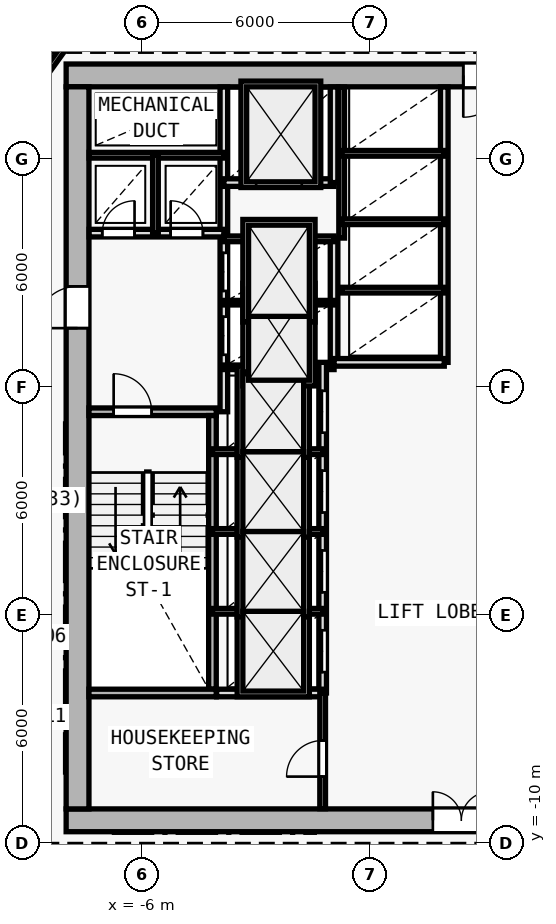
"""IFC4 building model, lengths in metres.
Left out: names, types, materials, properties, quantities, classifications, styles, units other than length and angle.
Written with IfcOpenShell. Run it as: python <this file> out.ifc"""

import sys

from ifc_helpers import new_model, si_unit, direction, frame, frame_2d, origin, origin_2d, place, context, subcontext, project, spatial, rectangle, i_section, extrude, element, fill, save


model = new_model("IFC4")
c1 = context("Model", 3, precision=1e-05, world=origin(), true_north=direction((0.0, 1.0)))
c2 = subcontext(c1, "Body", "Model", "MODEL_VIEW")
j1 = project(units=[si_unit("LENGTHUNIT", "METRE"), si_unit("PLANEANGLEUNIT", "RADIAN")], contexts=[c1])
p1 = place(None, origin())
s1 = spatial("IfcSite", under=j1, at=p1, CompositionType="ELEMENT")
p2 = place(p1, origin())
s2 = spatial("IfcBuilding", under=s1, at=p2, CompositionType="ELEMENT")
p3 = place(p2, frame((0.0, 0.0, 125.7)))
s3 = spatial("IfcBuildingStorey", under=s2, at=p3, CompositionType="ELEMENT", Elevation=125.7)
for number, where, z_axis, x_axis in (
    (1, (-7.7, -9.4, 0.0), (0.0, 0.0, 1.0), (1.0, 0.0, 0.0)),
    (2, (-7.7, 10.2, 0.0), (0.0, 0.0, 1.0), (1.0, 0.0, 0.0)),
    (3, (0.0, -9.4, 0.0), (0.0, 0.0, 1.0), (1.0, 0.0, 0.0)),
    (4, (-7.7, 2.0, 0.0), (0.0, 0.0, 1.0), (1.0, 0.0, 0.0)),
):
    element("IfcColumn", number, at=place(p3, frame(where, z_axis=z_axis, x_axis=x_axis)), inside=s3, PredefinedType="COLUMN", context=c2, shape_type="SweptSolid", body=[
        extrude(i_section(OverallWidth=0.409, OverallDepth=0.425, WebThickness=0.021, FlangeThickness=0.034, FilletRadius=0.015, at=origin_2d()), origin(), (0.0, 0.0, 1.0), 3.6),
    ])
p4 = place(p3, frame((-8.0, -9.4, 0.0), z_axis=(0.0, 0.0, 1.0), x_axis=(1.0, 0.0, 0.0)))
e5 = element("IfcWall", 5, at=p4, inside=s3, PredefinedType="SHEAR", context=c2, shape_type="SweptSolid", body=[
    extrude(rectangle(XDim=16.0, YDim=0.6, at=frame_2d((8.0, 0.0))), origin(), (0.0, 0.0, 1.0), 3.28),
])
p5 = place(p4, frame((9.65, 0.0, 0.0)))
e6 = element("IfcOpeningElement", 6, at=p5, cuts=e5, PredefinedType="OPENING", context=c2, shape_type="SweptSolid", body=[
    extrude(rectangle(XDim=1.5, YDim=2.2, at=frame_2d((0.75, 1.1))), frame((0.0, 0.31, 0.0), z_axis=(0.0, -1.0, 0.0), x_axis=(1.0, 0.0, 0.0)), (0.0, 0.0, 1.0), 0.62),
])
p6 = place(p3, frame((8.0, 10.2, 0.0), z_axis=(0.0, 0.0, 1.0), x_axis=(-1.0, 0.0, 0.0)))
e7 = element("IfcWall", 7, at=p6, inside=s3, PredefinedType="SHEAR", context=c2, shape_type="SweptSolid", body=[
    extrude(rectangle(XDim=16.0, YDim=0.6, at=frame_2d((8.0, 0.0))), origin(), (0.0, 0.0, 1.0), 3.28),
])
p7 = place(p6, frame((4.45, 0.0, 0.0)))
e8 = element("IfcOpeningElement", 8, at=p7, cuts=e7, PredefinedType="OPENING", context=c2, shape_type="SweptSolid", body=[
    extrude(rectangle(XDim=1.1, YDim=2.15, at=frame_2d((0.55, 1.075))), frame((0.0, 0.31, 0.0), z_axis=(0.0, -1.0, 0.0), x_axis=(1.0, 0.0, 0.0)), (0.0, 0.0, 1.0), 0.62),
])
p8 = place(p3, frame((-7.7, -9.1, 0.0), z_axis=(0.0, 0.0, 1.0), x_axis=(0.0, 1.0, 0.0)))
e9 = element("IfcWall", 9, at=p8, inside=s3, PredefinedType="SHEAR", context=c2, shape_type="SweptSolid", body=[
    extrude(rectangle(XDim=19.0, YDim=0.6, at=frame_2d((9.5, 0.0))), origin(), (0.0, 0.0, 1.0), 3.28),
])
p9 = place(p8, frame((12.65, 0.0, 0.0)))
e10 = element("IfcOpeningElement", 10, at=p9, cuts=e9, PredefinedType="OPENING", context=c2, shape_type="SweptSolid", body=[
    extrude(rectangle(XDim=1.1, YDim=2.15, at=frame_2d((0.55, 1.075))), frame((0.0, 0.31, 0.0), z_axis=(0.0, -1.0, 0.0), x_axis=(1.0, 0.0, 0.0)), (0.0, 0.0, 1.0), 0.62),
])
p10 = place(p3, frame((-7.4, 1.35, 0.0), z_axis=(0.0, 0.0, 1.0), x_axis=(1.0, 0.0, 0.0)))
e11 = element("IfcWall", 11, at=p10, inside=s3, PredefinedType="SOLIDWALL", context=c2, shape_type="SweptSolid", body=[
    extrude(rectangle(XDim=3.35, YDim=0.2, at=frame_2d((1.675, 0.0))), origin(), (0.0, 0.0, 1.0), 3.28),
])
p11 = place(p10, frame((0.65, 0.0, 0.0)))
e12 = element("IfcOpeningElement", 12, at=p11, cuts=e11, PredefinedType="OPENING", context=c2, shape_type="SweptSolid", body=[
    extrude(rectangle(XDim=1.0, YDim=2.15, at=frame_2d((0.5, 1.075))), frame((0.0, 0.11, 0.0), z_axis=(0.0, -1.0, 0.0), x_axis=(1.0, 0.0, 0.0)), (0.0, 0.0, 1.0), 0.22),
])
p12 = place(p3, frame((-4.15, -5.95, 0.0), z_axis=(0.0, 0.0, 1.0), x_axis=(0.0, 1.0, 0.0)))
e13 = element("IfcWall", 13, at=p12, inside=s3, PredefinedType="SOLIDWALL", context=c2, shape_type="SweptSolid", body=[
    extrude(rectangle(XDim=7.2, YDim=0.2, at=frame_2d((3.6, 0.0))), origin(), (0.0, 0.0, 1.0), 3.28),
])
p13 = place(p3, frame((-3.85, 1.35, 0.0), z_axis=(0.0, 0.0, 1.0), x_axis=(0.0, 1.0, 0.0)))
e14 = element("IfcWall", 14, at=p13, inside=s3, PredefinedType="SOLIDWALL", context=c2, shape_type="SweptSolid", body=[
    extrude(rectangle(XDim=8.545, YDim=0.2, at=frame_2d((4.272, 0.0))), origin(), (0.0, 0.0, 1.0), 3.28),
])
p14 = place(p13, frame((1.5, 0.0, 0.0)))
e15 = element("IfcOpeningElement", 15, at=p14, cuts=e14, PredefinedType="OPENING", context=c2, shape_type="SweptSolid", body=[
    extrude(rectangle(XDim=1.0, YDim=2.15, at=frame_2d((0.5, 1.075))), frame((0.0, 0.11, 0.0), z_axis=(0.0, -1.0, 0.0), x_axis=(1.0, 0.0, 0.0)), (0.0, 0.0, 1.0), 0.22),
])
p15 = place(p13, frame((3.18, 0.0, 0.0)))
e16 = element("IfcOpeningElement", 16, at=p15, cuts=e14, PredefinedType="OPENING", context=c2, shape_type="SweptSolid", body=[
    extrude(rectangle(XDim=1.0, YDim=2.15, at=frame_2d((0.5, 1.075))), frame((0.0, 0.11, 0.0), z_axis=(0.0, -1.0, 0.0), x_axis=(1.0, 0.0, 0.0)), (0.0, 0.0, 1.0), 0.22),
])
p16 = place(p3, frame((-7.395, 6.05, 0.0), z_axis=(0.0, 0.0, 1.0), x_axis=(1.0, 0.0, 0.0)))
e17 = element("IfcWall", 17, at=p16, inside=s3, PredefinedType="SOLIDWALL", context=c2, shape_type="SweptSolid", body=[
    extrude(rectangle(XDim=3.545, YDim=0.2, at=frame_2d((1.772, 0.0))), origin(), (0.0, 0.0, 1.0), 3.28),
])
p17 = place(p16, frame((0.345, 0.0, 0.0)))
e18 = element("IfcOpeningElement", 18, at=p17, cuts=e17, PredefinedType="OPENING", context=c2, shape_type="SweptSolid", body=[
    extrude(rectangle(XDim=0.85, YDim=2.1, at=frame_2d((0.425, 1.05))), frame((0.0, 0.11, 0.0), z_axis=(0.0, -1.0, 0.0), x_axis=(1.0, 0.0, 0.0)), (0.0, 0.0, 1.0), 0.22),
])
p18 = place(p16, frame((2.145, 0.0, 0.0)))
e19 = element("IfcOpeningElement", 19, at=p18, cuts=e17, PredefinedType="OPENING", context=c2, shape_type="SweptSolid", body=[
    extrude(rectangle(XDim=0.85, YDim=2.1, at=frame_2d((0.425, 1.05))), frame((0.0, 0.11, 0.0), z_axis=(0.0, -1.0, 0.0), x_axis=(1.0, 0.0, 0.0)), (0.0, 0.0, 1.0), 0.22),
])
p19 = place(p3, frame((-7.395, 8.1, 0.0), z_axis=(0.0, 0.0, 1.0), x_axis=(1.0, 0.0, 0.0)))
e20 = element("IfcWall", 20, at=p19, inside=s3, PredefinedType="PARTITIONING", context=c2, shape_type="SweptSolid", body=[
    extrude(rectangle(XDim=3.545, YDim=0.15, at=frame_2d((1.772, 0.0))), origin(), (0.0, 0.0, 1.0), 3.28),
])
p20 = place(p3, frame((-5.65, 6.05, 0.0), z_axis=(0.0, 0.0, 1.0), x_axis=(0.0, 1.0, 0.0)))
e21 = element("IfcWall", 21, at=p20, inside=s3, PredefinedType="PARTITIONING", context=c2, shape_type="SweptSolid", body=[
    extrude(rectangle(XDim=2.05, YDim=0.15, at=frame_2d((1.025, 0.0))), origin(), (0.0, 0.0, 1.0), 3.28),
])
p21 = place(p3, frame((-0.95, 2.65, 0.0), z_axis=(0.0, 0.0, 1.0), x_axis=(0.0, 1.0, 0.0)))
e22 = element("IfcWall", 22, at=p21, inside=s3, PredefinedType="SOLIDWALL", context=c2, shape_type="SweptSolid", body=[
    extrude(rectangle(XDim=3.27, YDim=0.2, at=frame_2d((1.635, 0.0))), origin(), (0.0, 0.0, 1.0), 3.28),
])
for number, where, z_axis, x_axis in (
    (23, (-3.85, 2.52, 0.0), (0.0, 0.0, 1.0), (1.0, 0.0, 0.0)),
    (24, (-3.85, 4.22, 0.0), (0.0, 0.0, 1.0), (1.0, 0.0, 0.0)),
):
    element("IfcWall", number, at=place(p3, frame(where, z_axis=z_axis, x_axis=x_axis)), inside=s3, PredefinedType="PARTITIONING", context=c2, shape_type="SweptSolid", body=[
        extrude(rectangle(XDim=2.9, YDim=0.12, at=frame_2d((1.45, 0.0))), origin(), (0.0, 0.0, 1.0), 3.28),
    ])
p22 = place(p3, frame((-3.85, 5.9, 0.0), z_axis=(0.0, 0.0, 1.0), x_axis=(1.0, 0.0, 0.0)))
e25 = element("IfcWall", 25, at=p22, inside=s3, PredefinedType="PARTITIONING", context=c2, shape_type="SweptSolid", body=[
    extrude(rectangle(XDim=2.9, YDim=0.15, at=frame_2d((1.45, 0.0))), origin(), (0.0, 0.0, 1.0), 3.28),
])
p23 = place(p3, frame((-3.85, 7.38, 0.0), z_axis=(0.0, 0.0, 1.0), x_axis=(1.0, 0.0, 0.0)))
e26 = element("IfcWall", 26, at=p23, inside=s3, PredefinedType="SOLIDWALL", context=c2, shape_type="SweptSolid", body=[
    extrude(rectangle(XDim=2.9, YDim=0.2, at=frame_2d((1.45, 0.0))), origin(), (0.0, 0.0, 1.0), 3.28),
])
p24 = place(p23, frame((0.85, 0.0, 0.0)))
e27 = element("IfcOpeningElement", 27, at=p24, cuts=e26, PredefinedType="OPENING", context=c2, shape_type="SweptSolid", body=[
    extrude(rectangle(XDim=1.2, YDim=2.2, at=frame_2d((0.6, 1.1))), frame((0.0, 0.11, 0.0), z_axis=(0.0, -1.0, 0.0), x_axis=(1.0, 0.0, 0.0)), (0.0, 0.0, 1.0), 0.22),
])
p25 = place(p3, frame((-0.95, 7.38, 0.0), z_axis=(0.0, 0.0, 1.0), x_axis=(0.0, 1.0, 0.0)))
e28 = element("IfcWall", 28, at=p25, inside=s3, PredefinedType="SOLIDWALL", context=c2, shape_type="SweptSolid", body=[
    extrude(rectangle(XDim=2.515, YDim=0.2, at=frame_2d((1.258, 0.0))), origin(), (0.0, 0.0, 1.0), 3.28),
])
p26 = place(p3, frame((-1.25, -6.05, 0.0), z_axis=(0.0, 0.0, 1.0), x_axis=(0.0, 1.0, 0.0)))
e29 = element("IfcWall", 29, at=p26, inside=s3, PredefinedType="SOLIDWALL", context=c2, shape_type="SweptSolid", body=[
    extrude(rectangle(XDim=8.7, YDim=0.2, at=frame_2d((4.35, 0.0))), origin(), (0.0, 0.0, 1.0), 3.28),
])
p27 = place(p26, frame((0.55, 0.0, 0.0)))
e30 = element("IfcOpeningElement", 30, at=p27, cuts=e29, PredefinedType="OPENING", context=c2, shape_type="SweptSolid", body=[
    extrude(rectangle(XDim=1.1, YDim=2.15, at=frame_2d((0.55, 1.075))), frame((0.0, 0.11, 0.0), z_axis=(0.0, -1.0, 0.0), x_axis=(1.0, 0.0, 0.0)), (0.0, 0.0, 1.0), 0.22),
])
p28 = place(p26, frame((2.65, 0.0, 0.0)))
e31 = element("IfcOpeningElement", 31, at=p28, cuts=e29, PredefinedType="OPENING", context=c2, shape_type="SweptSolid", body=[
    extrude(rectangle(XDim=1.1, YDim=2.15, at=frame_2d((0.55, 1.075))), frame((0.0, 0.11, 0.0), z_axis=(0.0, -1.0, 0.0), x_axis=(1.0, 0.0, 0.0)), (0.0, 0.0, 1.0), 0.22),
])
p29 = place(p26, frame((4.75, 0.0, 0.0)))
e32 = element("IfcOpeningElement", 32, at=p29, cuts=e29, PredefinedType="OPENING", context=c2, shape_type="SweptSolid", body=[
    extrude(rectangle(XDim=1.1, YDim=2.15, at=frame_2d((0.55, 1.075))), frame((0.0, 0.11, 0.0), z_axis=(0.0, -1.0, 0.0), x_axis=(1.0, 0.0, 0.0)), (0.0, 0.0, 1.0), 0.22),
])
p30 = place(p26, frame((6.85, 0.0, 0.0)))
e33 = element("IfcOpeningElement", 33, at=p30, cuts=e29, PredefinedType="OPENING", context=c2, shape_type="SweptSolid", body=[
    extrude(rectangle(XDim=1.1, YDim=2.15, at=frame_2d((0.55, 1.075))), frame((0.0, 0.11, 0.0), z_axis=(0.0, -1.0, 0.0), x_axis=(1.0, 0.0, 0.0)), (0.0, 0.0, 1.0), 0.22),
])
for number, where, z_axis, x_axis in (
    (34, (-4.15, -3.9, 0.0), (0.0, 0.0, 1.0), (1.0, 0.0, 0.0)),
    (35, (-4.15, -1.8, 0.0), (0.0, 0.0, 1.0), (1.0, 0.0, 0.0)),
    (36, (-4.15, 0.3, 0.0), (0.0, 0.0, 1.0), (1.0, 0.0, 0.0)),
):
    element("IfcWall", number, at=place(p3, frame(where, z_axis=z_axis, x_axis=x_axis)), inside=s3, PredefinedType="PARTITIONING", context=c2, shape_type="SweptSolid", body=[
        extrude(rectangle(XDim=2.9, YDim=0.15, at=frame_2d((1.45, 0.0))), origin(), (0.0, 0.0, 1.0), 3.28),
    ])
p31 = place(p3, frame((1.95, 2.65, 0.0), z_axis=(0.0, 0.0, 1.0), x_axis=(0.0, 1.0, 0.0)))
e37 = element("IfcWall", 37, at=p31, inside=s3, PredefinedType="SOLIDWALL", context=c2, shape_type="SweptSolid", body=[
    extrude(rectangle(XDim=7.245, YDim=0.2, at=frame_2d((3.623, 0.0))), origin(), (0.0, 0.0, 1.0), 3.28),
])
p32 = place(p3, frame((-0.95, 2.65, 0.0), z_axis=(0.0, 0.0, 1.0), x_axis=(1.0, 0.0, 0.0)))
e38 = element("IfcWall", 38, at=p32, inside=s3, PredefinedType="SOLIDWALL", context=c2, shape_type="SweptSolid", body=[
    extrude(rectangle(XDim=2.9, YDim=0.2, at=frame_2d((1.45, 0.0))), origin(), (0.0, 0.0, 1.0), 3.28),
])
p33 = place(p3, frame((-0.75, 5.92, 0.0), z_axis=(0.0, 0.0, 1.0), x_axis=(0.0, 1.0, 0.0)))
e39 = element("IfcWall", 39, at=p33, inside=s3, PredefinedType="PARTITIONING", context=c2, shape_type="SweptSolid", body=[
    extrude(rectangle(XDim=3.975, YDim=0.15, at=frame_2d((1.988, 0.0))), origin(), (0.0, 0.0, 1.0), 3.28),
])
for number, where, z_axis, x_axis in (
    (40, (-0.75, 4.55, 0.0), (0.0, 0.0, 1.0), (1.0, 0.0, 0.0)),
    (41, (-0.75, 6.35, 0.0), (0.0, 0.0, 1.0), (1.0, 0.0, 0.0)),
    (42, (-0.75, 8.15, 0.0), (0.0, 0.0, 1.0), (1.0, 0.0, 0.0)),
):
    element("IfcWall", number, at=place(p3, frame(where, z_axis=z_axis, x_axis=x_axis)), inside=s3, PredefinedType="PARTITIONING", context=c2, shape_type="SweptSolid", body=[
        extrude(rectangle(XDim=2.7, YDim=0.15, at=frame_2d((1.35, 0.0))), origin(), (0.0, 0.0, 1.0), 3.28),
    ])
p34 = place(p3, frame((-7.4, -6.05, 0.0), z_axis=(0.0, 0.0, 1.0), x_axis=(1.0, 0.0, 0.0)))
e43 = element("IfcWall", 43, at=p34, inside=s3, PredefinedType="SOLIDWALL", context=c2, shape_type="SweptSolid", body=[
    extrude(rectangle(XDim=3.35, YDim=0.2, at=frame_2d((1.675, 0.0))), origin(), (0.0, 0.0, 1.0), 3.28),
])
p35 = place(p3, frame((-4.04, -6.05, 0.0), z_axis=(0.0, 0.0, 1.0), x_axis=(1.0, 0.0, 0.0)))
e44 = element("IfcWall", 44, at=p35, inside=s3, PredefinedType="SOLIDWALL", context=c2, shape_type="SweptSolid", body=[
    extrude(rectangle(XDim=2.79, YDim=0.2, at=frame_2d((1.395, 0.0))), origin(), (0.0, 0.0, 1.0), 3.28),
])
p36 = place(p3, frame((-1.25, -9.095, 0.0), z_axis=(0.0, 0.0, 1.0), x_axis=(0.0, 1.0, 0.0)))
e45 = element("IfcWall", 45, at=p36, inside=s3, PredefinedType="PARTITIONING", context=c2, shape_type="SweptSolid", body=[
    extrude(rectangle(XDim=3.045, YDim=0.15, at=frame_2d((1.522, 0.0))), origin(), (0.0, 0.0, 1.0), 3.28),
])
p37 = place(p36, frame((0.845, 0.0, 0.0)))
e46 = element("IfcOpeningElement", 46, at=p37, cuts=e45, PredefinedType="OPENING", context=c2, shape_type="SweptSolid", body=[
    extrude(rectangle(XDim=0.95, YDim=2.1, at=frame_2d((0.475, 1.05))), frame((0.0, 0.085, 0.0), z_axis=(0.0, -1.0, 0.0), x_axis=(1.0, 0.0, 0.0)), (0.0, 0.0, 1.0), 0.17),
])
p38 = place(p3, frame((-9.86, 8.426, 0.0), z_axis=(0.0, 0.0, 1.0), x_axis=(0.582449511476, 0.812866881218, 0.0)))
e47 = element("IfcWall", 47, at=p38, inside=s3, PredefinedType="PARTITIONING", context=c2, shape_type="SweptSolid", body=[
    extrude(rectangle(XDim=4.84, YDim=0.15, at=frame_2d((2.42, 0.0))), origin(), (0.0, 0.0, 1.0), 2.895),
])
p39 = place(p5, origin())
e48 = element("IfcDoor", 48, at=p39, inside=s3, OperationType="DOUBLE_DOOR_SINGLE_SWING", PredefinedType="DOOR", context=c2, shape_type="SweptSolid", body=[
    extrude(rectangle(XDim=1.5, YDim=2.2, at=frame_2d((0.75, 1.1))), frame((0.0, 0.025, 0.0), z_axis=(0.0, -1.0, 0.0), x_axis=(1.0, 0.0, 0.0)), (0.0, 0.0, 1.0), 0.05),
])
fill(e6, e48)
p40 = place(p9, origin())
e49 = element("IfcDoor", 49, at=p40, inside=s3, OperationType="SINGLE_SWING_LEFT", PredefinedType="DOOR", context=c2, shape_type="SweptSolid", body=[
    extrude(rectangle(XDim=1.1, YDim=2.15, at=frame_2d((0.55, 1.075))), frame((0.0, 0.025, 0.0), z_axis=(0.0, -1.0, 0.0), x_axis=(1.0, 0.0, 0.0)), (0.0, 0.0, 1.0), 0.05),
])
fill(e10, e49)
p41 = place(p7, origin())
e50 = element("IfcDoor", 50, at=p41, inside=s3, OperationType="SINGLE_SWING_RIGHT", PredefinedType="DOOR", context=c2, shape_type="SweptSolid", body=[
    extrude(rectangle(XDim=1.1, YDim=2.15, at=frame_2d((0.55, 1.075))), frame((0.0, 0.025, 0.0), z_axis=(0.0, -1.0, 0.0), x_axis=(1.0, 0.0, 0.0)), (0.0, 0.0, 1.0), 0.05),
])
fill(e8, e50)
p42 = place(p11, origin())
e51 = element("IfcDoor", 51, at=p42, inside=s3, OperationType="SINGLE_SWING_LEFT", PredefinedType="DOOR", context=c2, shape_type="SweptSolid", body=[
    extrude(rectangle(XDim=1.0, YDim=2.15, at=frame_2d((0.5, 1.075))), frame((0.0, 0.025, 0.0), z_axis=(0.0, -1.0, 0.0), x_axis=(1.0, 0.0, 0.0)), (0.0, 0.0, 1.0), 0.05),
])
fill(e12, e51)
p43 = place(p17, origin())
e52 = element("IfcDoor", 52, at=p43, inside=s3, OperationType="SINGLE_SWING_RIGHT", PredefinedType="DOOR", context=c2, shape_type="SweptSolid", body=[
    extrude(rectangle(XDim=0.85, YDim=2.1, at=frame_2d((0.425, 1.05))), frame((0.0, 0.025, 0.0), z_axis=(0.0, -1.0, 0.0), x_axis=(1.0, 0.0, 0.0)), (0.0, 0.0, 1.0), 0.05),
])
fill(e18, e52)
p44 = place(p18, origin())
e53 = element("IfcDoor", 53, at=p44, inside=s3, OperationType="SINGLE_SWING_LEFT", PredefinedType="DOOR", context=c2, shape_type="SweptSolid", body=[
    extrude(rectangle(XDim=0.85, YDim=2.1, at=frame_2d((0.425, 1.05))), frame((0.0, 0.025, 0.0), z_axis=(0.0, -1.0, 0.0), x_axis=(1.0, 0.0, 0.0)), (0.0, 0.0, 1.0), 0.05),
])
fill(e19, e53)
p45 = place(p24, origin())
e54 = element("IfcDoor", 54, at=p45, inside=s3, OperationType="DOUBLE_DOOR_SLIDING", PredefinedType="DOOR", context=c2, shape_type="SweptSolid", body=[
    extrude(rectangle(XDim=1.2, YDim=2.2, at=frame_2d((0.6, 1.1))), frame((0.0, 0.025, 0.0), z_axis=(0.0, -1.0, 0.0), x_axis=(1.0, 0.0, 0.0)), (0.0, 0.0, 1.0), 0.05),
])
fill(e27, e54)
p46 = place(p27, origin())
e55 = element("IfcDoor", 55, at=p46, inside=s3, OperationType="DOUBLE_DOOR_SLIDING", PredefinedType="DOOR", context=c2, shape_type="SweptSolid", body=[
    extrude(rectangle(XDim=1.1, YDim=2.15, at=frame_2d((0.55, 1.075))), frame((0.0, 0.025, 0.0), z_axis=(0.0, -1.0, 0.0), x_axis=(1.0, 0.0, 0.0)), (0.0, 0.0, 1.0), 0.05),
])
fill(e30, e55)
p47 = place(p28, origin())
e56 = element("IfcDoor", 56, at=p47, inside=s3, OperationType="DOUBLE_DOOR_SLIDING", PredefinedType="DOOR", context=c2, shape_type="SweptSolid", body=[
    extrude(rectangle(XDim=1.1, YDim=2.15, at=frame_2d((0.55, 1.075))), frame((0.0, 0.025, 0.0), z_axis=(0.0, -1.0, 0.0), x_axis=(1.0, 0.0, 0.0)), (0.0, 0.0, 1.0), 0.05),
])
fill(e31, e56)
p48 = place(p29, origin())
e57 = element("IfcDoor", 57, at=p48, inside=s3, OperationType="DOUBLE_DOOR_SLIDING", PredefinedType="DOOR", context=c2, shape_type="SweptSolid", body=[
    extrude(rectangle(XDim=1.1, YDim=2.15, at=frame_2d((0.55, 1.075))), frame((0.0, 0.025, 0.0), z_axis=(0.0, -1.0, 0.0), x_axis=(1.0, 0.0, 0.0)), (0.0, 0.0, 1.0), 0.05),
])
fill(e32, e57)
p49 = place(p30, origin())
e58 = element("IfcDoor", 58, at=p49, inside=s3, OperationType="DOUBLE_DOOR_SLIDING", PredefinedType="DOOR", context=c2, shape_type="SweptSolid", body=[
    extrude(rectangle(XDim=1.1, YDim=2.15, at=frame_2d((0.55, 1.075))), frame((0.0, 0.025, 0.0), z_axis=(0.0, -1.0, 0.0), x_axis=(1.0, 0.0, 0.0)), (0.0, 0.0, 1.0), 0.05),
])
fill(e33, e58)
p50 = place(p14, origin())
e59 = element("IfcDoor", 59, at=p50, inside=s3, OperationType="DOUBLE_DOOR_SLIDING", PredefinedType="DOOR", context=c2, shape_type="SweptSolid", body=[
    extrude(rectangle(XDim=1.0, YDim=2.15, at=frame_2d((0.5, 1.075))), frame((0.0, 0.025, 0.0), z_axis=(0.0, -1.0, 0.0), x_axis=(1.0, 0.0, 0.0)), (0.0, 0.0, 1.0), 0.05),
])
fill(e15, e59)
p51 = place(p15, origin())
e60 = element("IfcDoor", 60, at=p51, inside=s3, OperationType="DOUBLE_DOOR_SLIDING", PredefinedType="DOOR", context=c2, shape_type="SweptSolid", body=[
    extrude(rectangle(XDim=1.0, YDim=2.15, at=frame_2d((0.5, 1.075))), frame((0.0, 0.025, 0.0), z_axis=(0.0, -1.0, 0.0), x_axis=(1.0, 0.0, 0.0)), (0.0, 0.0, 1.0), 0.05),
])
fill(e16, e60)
p52 = place(p37, origin())
e61 = element("IfcDoor", 61, at=p52, inside=s3, OperationType="SINGLE_SWING_LEFT", PredefinedType="DOOR", context=c2, shape_type="SweptSolid", body=[
    extrude(rectangle(XDim=0.95, YDim=2.1, at=frame_2d((0.475, 1.05))), frame((0.0, 0.025, 0.0), z_axis=(0.0, -1.0, 0.0), x_axis=(1.0, 0.0, 0.0)), (0.0, 0.0, 1.0), 0.05),
])
fill(e46, e61)
save(model, sys.argv[1])
